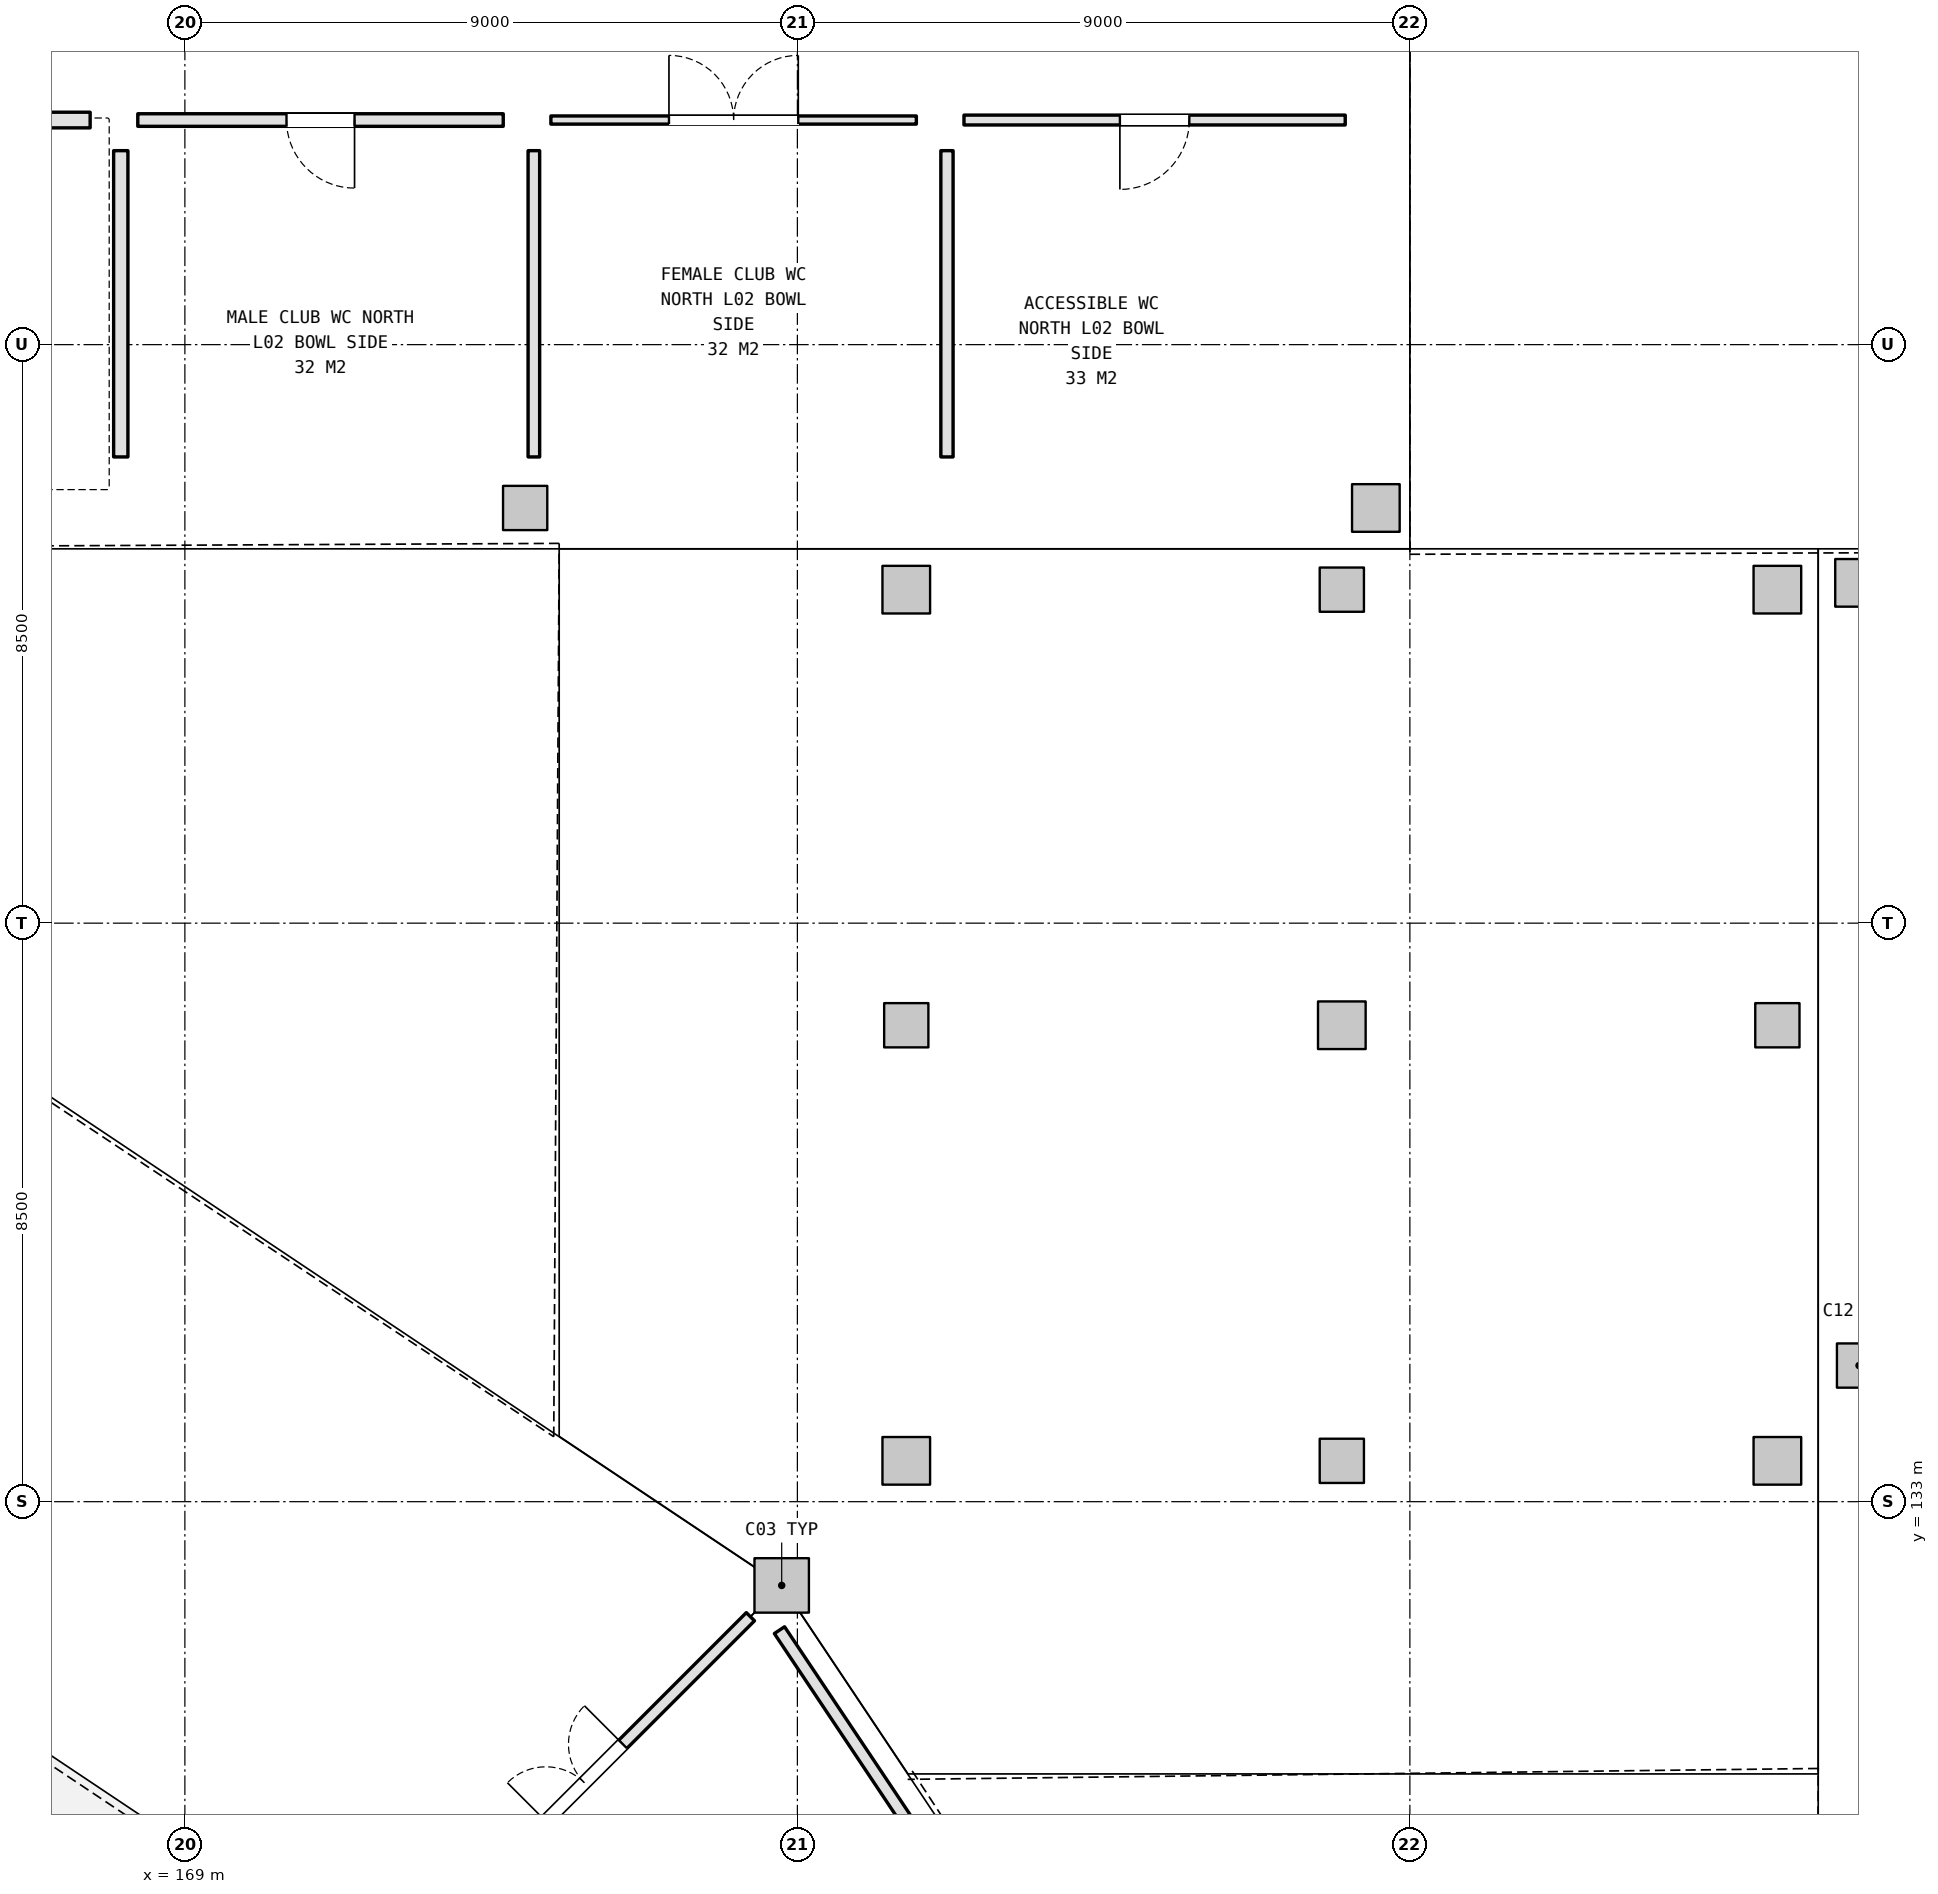
"""IFC4 building model, lengths in metres.
Left out: names, types, materials, properties, quantities, classifications, styles, units other than length and angle.
Written with IfcOpenShell. Run it as: python <this file> out.ifc"""

import sys

from ifc_helpers import new_model, si_unit, direction, frame, frame_2d, origin, origin_2d, place, context, subcontext, project, spatial, rectangle, extrude, element, fill, save


model = new_model("IFC4")
c1 = context("Model", 3, precision=1e-05, world=origin(), true_north=direction((0.0, 1.0)))
c2 = subcontext(c1, "Body", "Model", "MODEL_VIEW")
j1 = project(units=[si_unit("LENGTHUNIT", "METRE"), si_unit("PLANEANGLEUNIT", "RADIAN")], contexts=[c1])
p1 = place(None, origin())
s1 = spatial("IfcSite", under=j1, at=p1, CompositionType="ELEMENT")
p2 = place(p1, origin())
s2 = spatial("IfcBuilding", under=s1, at=p2, CompositionType="ELEMENT")
p3 = place(p2, frame((0.0, 0.0, 10.8)))
s3 = spatial("IfcBuildingStorey", under=s2, at=p3, CompositionType="ELEMENT", Elevation=10.8)
p4 = place(p3, frame((177.77, 131.77, 0.0), z_axis=(0.0, 0.0, 1.0), x_axis=(1.0, 0.0, 0.0)))
e1 = element("IfcColumn", 1, at=p4, inside=s3, PredefinedType="COLUMN", context=c2, shape_type="SweptSolid", body=[
    extrude(rectangle(XDim=0.8, YDim=0.8, at=origin_2d()), origin(), (0.0, 0.0, 1.0), 5.4),
])
p5 = place(p3, frame((193.6, 135.0, 0.0), z_axis=(0.0, 0.0, 1.0), x_axis=(1.0, 0.0, 0.0)))
e2 = element("IfcColumn", 2, at=p5, inside=s3, PredefinedType="COLUMN", context=c2, shape_type="SweptSolid", body=[
    extrude(rectangle(XDim=0.65, YDim=0.65, at=origin_2d()), origin(), (0.0, 0.0, 1.0), 5.4),
])
p6 = place(p3, frame((193.6, 146.5, 0.0), z_axis=(0.0, 0.0, 1.0), x_axis=(1.0, 0.0, 0.0)))
e3 = element("IfcColumn", 3, at=p6, inside=s3, PredefinedType="COLUMN", context=c2, shape_type="SweptSolid", body=[
    extrude(rectangle(XDim=0.7, YDim=0.7, at=origin_2d()), origin(), (0.0, 0.0, 1.0), 5.4),
])
p7 = place(p3, frame((174.0, 147.6, 0.0), z_axis=(0.0, 0.0, 1.0), x_axis=(1.0, 0.0, 0.0)))
e4 = element("IfcColumn", 4, at=p7, inside=s3, PredefinedType="COLUMN", context=c2, shape_type="SweptSolid", body=[
    extrude(rectangle(XDim=0.65, YDim=0.65, at=origin_2d()), origin(), (0.0, 0.0, 1.0), 5.4),
])
for number, where, z_axis, x_axis in (
    (5, (186.5, 147.6, 0.0), (0.0, 0.0, 1.0), (1.0, 0.0, 0.0)),
    (6, (179.6, 133.6, 0.0), (0.0, 0.0, 1.0), (1.0, 0.0, 0.0)),
):
    element("IfcColumn", number, at=place(p3, frame(where, z_axis=z_axis, x_axis=x_axis)), inside=s3, PredefinedType="COLUMN", context=c2, shape_type="SweptSolid", body=[
        extrude(rectangle(XDim=0.7, YDim=0.7, at=origin_2d()), origin(), (0.0, 0.0, 1.0), 5.4),
    ])
p8 = place(p3, frame((179.6, 140.0, 0.0), z_axis=(0.0, 0.0, 1.0), x_axis=(1.0, 0.0, 0.0)))
e7 = element("IfcColumn", 7, at=p8, inside=s3, PredefinedType="COLUMN", context=c2, shape_type="SweptSolid", body=[
    extrude(rectangle(XDim=0.65, YDim=0.65, at=origin_2d()), origin(), (0.0, 0.0, 1.0), 5.4),
])
p9 = place(p3, frame((179.6, 146.4, 0.0), z_axis=(0.0, 0.0, 1.0), x_axis=(1.0, 0.0, 0.0)))
e8 = element("IfcColumn", 8, at=p9, inside=s3, PredefinedType="COLUMN", context=c2, shape_type="SweptSolid", body=[
    extrude(rectangle(XDim=0.7, YDim=0.7, at=origin_2d()), origin(), (0.0, 0.0, 1.0), 5.4),
])
p10 = place(p3, frame((186.0, 133.6, 0.0), z_axis=(0.0, 0.0, 1.0), x_axis=(1.0, 0.0, 0.0)))
e9 = element("IfcColumn", 9, at=p10, inside=s3, PredefinedType="COLUMN", context=c2, shape_type="SweptSolid", body=[
    extrude(rectangle(XDim=0.65, YDim=0.65, at=origin_2d()), origin(), (0.0, 0.0, 1.0), 5.4),
])
p11 = place(p3, frame((186.0, 140.0, 0.0), z_axis=(0.0, 0.0, 1.0), x_axis=(1.0, 0.0, 0.0)))
e10 = element("IfcColumn", 10, at=p11, inside=s3, PredefinedType="COLUMN", context=c2, shape_type="SweptSolid", body=[
    extrude(rectangle(XDim=0.7, YDim=0.7, at=origin_2d()), origin(), (0.0, 0.0, 1.0), 5.4),
])
p12 = place(p3, frame((186.0, 146.4, 0.0), z_axis=(0.0, 0.0, 1.0), x_axis=(1.0, 0.0, 0.0)))
e11 = element("IfcColumn", 11, at=p12, inside=s3, PredefinedType="COLUMN", context=c2, shape_type="SweptSolid", body=[
    extrude(rectangle(XDim=0.65, YDim=0.65, at=origin_2d()), origin(), (0.0, 0.0, 1.0), 5.4),
])
p13 = place(p3, frame((192.4, 133.6, 0.0), z_axis=(0.0, 0.0, 1.0), x_axis=(1.0, 0.0, 0.0)))
e12 = element("IfcColumn", 12, at=p13, inside=s3, PredefinedType="COLUMN", context=c2, shape_type="SweptSolid", body=[
    extrude(rectangle(XDim=0.7, YDim=0.7, at=origin_2d()), origin(), (0.0, 0.0, 1.0), 5.4),
])
p14 = place(p3, frame((192.4, 140.0, 0.0), z_axis=(0.0, 0.0, 1.0), x_axis=(1.0, 0.0, 0.0)))
e13 = element("IfcColumn", 13, at=p14, inside=s3, PredefinedType="COLUMN", context=c2, shape_type="SweptSolid", body=[
    extrude(rectangle(XDim=0.65, YDim=0.65, at=origin_2d()), origin(), (0.0, 0.0, 1.0), 5.4),
])
p15 = place(p3, frame((192.4, 146.4, 0.0), z_axis=(0.0, 0.0, 1.0), x_axis=(1.0, 0.0, 0.0)))
e14 = element("IfcColumn", 14, at=p15, inside=s3, PredefinedType="COLUMN", context=c2, shape_type="SweptSolid", body=[
    extrude(rectangle(XDim=0.7, YDim=0.7, at=origin_2d()), origin(), (0.0, 0.0, 1.0), 5.4),
])
p16 = place(p3, frame((142.629, 153.3, 0.0), z_axis=(0.0, 0.0, 1.0), x_axis=(1.0, 0.0, 0.0)))
e15 = element("IfcWall", 15, at=p16, inside=s3, PredefinedType="PLUMBINGWALL", context=c2, shape_type="SweptSolid", body=[
    extrude(rectangle(XDim=24.979, YDim=0.23, at=frame_2d((12.49, 0.0))), origin(), (0.0, 0.0, 1.0), 4.505),
])
p17 = place(p16, frame((11.929, 0.0, 0.0)))
e16 = element("IfcOpeningElement", 16, at=p17, cuts=e15, PredefinedType="OPENING", context=c2, shape_type="SweptSolid", body=[
    extrude(rectangle(XDim=1.12, YDim=2.2, at=frame_2d((0.56, 1.1))), frame((0.0, 0.125, 0.0), z_axis=(0.0, -1.0, 0.0), x_axis=(1.0, 0.0, 0.0)), (0.0, 0.0, 1.0), 0.25),
])
p18 = place(p3, frame((168.308, 153.3, 0.0), z_axis=(0.0, 0.0, 1.0), x_axis=(1.0, 0.0, 0.0)))
e17 = element("IfcWall", 17, at=p18, inside=s3, PredefinedType="PARTITIONING", context=c2, shape_type="SweptSolid", body=[
    extrude(rectangle(XDim=5.37, YDim=0.185, at=frame_2d((2.685, 0.0))), origin(), (0.0, 0.0, 1.0), 4.505),
])
p19 = place(p18, frame((2.185, 0.0, 0.0)))
e18 = element("IfcOpeningElement", 18, at=p19, cuts=e17, PredefinedType="OPENING", context=c2, shape_type="SweptSolid", body=[
    extrude(rectangle(XDim=1.0, YDim=2.1, at=frame_2d((0.5, 1.05))), frame((0.0, 0.103, 0.0), z_axis=(0.0, -1.0, 0.0), x_axis=(1.0, 0.0, 0.0)), (0.0, 0.0, 1.0), 0.205),
])
p20 = place(p3, frame((168.058, 148.35, 0.0), z_axis=(0.0, 0.0, 1.0), x_axis=(0.0, 1.0, 0.0)))
e19 = element("IfcWall", 19, at=p20, inside=s3, PredefinedType="PLUMBINGWALL", context=c2, shape_type="SweptSolid", body=[
    extrude(rectangle(XDim=4.5, YDim=0.21, at=frame_2d((2.25, 0.0))), origin(), (0.0, 0.0, 1.0), 4.655),
])
p21 = place(p3, frame((174.378, 153.3, 0.0), z_axis=(0.0, 0.0, 1.0), x_axis=(1.0, 0.0, 0.0)))
e20 = element("IfcWall", 20, at=p21, inside=s3, PredefinedType="PARTITIONING", context=c2, shape_type="SweptSolid", body=[
    extrude(rectangle(XDim=5.37, YDim=0.12, at=frame_2d((2.685, 0.0))), origin(), (0.0, 0.0, 1.0), 5.12),
])
p22 = place(p21, frame((1.735, 0.0, 0.0)))
e21 = element("IfcOpeningElement", 21, at=p22, cuts=e20, PredefinedType="OPENING", context=c2, shape_type="SweptSolid", body=[
    extrude(rectangle(XDim=1.9, YDim=2.3, at=frame_2d((0.95, 1.15))), frame((0.0, 0.07, 0.0), z_axis=(0.0, -1.0, 0.0), x_axis=(1.0, 0.0, 0.0)), (0.0, 0.0, 1.0), 0.14),
])
p23 = place(p3, frame((174.128, 148.35, 0.0), z_axis=(0.0, 0.0, 1.0), x_axis=(0.0, 1.0, 0.0)))
e22 = element("IfcWall", 22, at=p23, inside=s3, PredefinedType="PARTITIONING", context=c2, shape_type="SweptSolid", body=[
    extrude(rectangle(XDim=4.5, YDim=0.17, at=frame_2d((2.25, 0.0))), origin(), (0.0, 0.0, 1.0), 4.505),
])
p24 = place(p3, frame((180.448, 153.3, 0.0), z_axis=(0.0, 0.0, 1.0), x_axis=(1.0, 0.0, 0.0)))
e23 = element("IfcWall", 23, at=p24, inside=s3, PredefinedType="PARTITIONING", context=c2, shape_type="SweptSolid", body=[
    extrude(rectangle(XDim=5.602, YDim=0.145, at=frame_2d((2.801, 0.0))), origin(), (0.0, 0.0, 1.0), 5.12),
])
p25 = place(p24, frame((2.291, 0.0, 0.0)))
e24 = element("IfcOpeningElement", 24, at=p25, cuts=e23, PredefinedType="OPENING", context=c2, shape_type="SweptSolid", body=[
    extrude(rectangle(XDim=1.02, YDim=2.15, at=frame_2d((0.51, 1.075))), frame((0.0, 0.083, 0.0), z_axis=(0.0, -1.0, 0.0), x_axis=(1.0, 0.0, 0.0)), (0.0, 0.0, 1.0), 0.165),
])
p26 = place(p3, frame((180.198, 148.35, 0.0), z_axis=(0.0, 0.0, 1.0), x_axis=(0.0, 1.0, 0.0)))
e25 = element("IfcWall", 25, at=p26, inside=s3, PredefinedType="PARTITIONING", context=c2, shape_type="SweptSolid", body=[
    extrude(rectangle(XDim=4.5, YDim=0.18, at=frame_2d((2.25, 0.0))), origin(), (0.0, 0.0, 1.0), 4.655),
])
p27 = place(p3, frame((172.431, 126.431, 0.0), z_axis=(0.0, 0.0, 1.0), x_axis=(0.707106781187, 0.707106781187, 0.0)))
e26 = element("IfcWall", 26, at=p27, inside=s3, PredefinedType="PARTITIONING", context=c2, shape_type="SweptSolid", body=[
    extrude(rectangle(XDim=6.9, YDim=0.17, at=frame_2d((3.45, 0.0))), origin(), (0.0, 0.0, 1.0), 4.255),
])
p28 = place(p27, frame((2.65, 0.0, 0.0)))
e27 = element("IfcOpeningElement", 27, at=p28, cuts=e26, PredefinedType="OPENING", context=c2, shape_type="SweptSolid", body=[
    extrude(rectangle(XDim=1.6, YDim=2.2, at=frame_2d((0.8, 1.1))), frame((0.0, 0.095, 0.0), z_axis=(0.0, -1.0, 0.0), x_axis=(1.0, 0.0, 0.0)), (0.0, 0.0, 1.0), 0.19),
])
p29 = place(p3, frame((177.737, 131.113, 0.0), z_axis=(0.0, 0.0, 1.0), x_axis=(0.555562946988, -0.831474480627, 0.0)))
e28 = element("IfcWall", 28, at=p29, inside=s3, PredefinedType="PARTITIONING", context=c2, shape_type="SweptSolid", body=[
    extrude(rectangle(XDim=19.192, YDim=0.18, at=frame_2d((9.596, 0.0))), origin(), (0.0, 0.0, 1.0), 5.12),
])
p30 = place(p19, frame((1.0, 0.0, 0.0), z_axis=(0.0, 0.0, 1.0), x_axis=(-1.0, 0.0, 0.0)))
e29 = element("IfcDoor", 29, at=p30, inside=s3, OperationType="SINGLE_SWING_RIGHT", PredefinedType="DOOR", context=c2, shape_type="SweptSolid", body=[
    extrude(rectangle(XDim=1.0, YDim=2.1, at=frame_2d((0.5, 1.05))), frame((0.0, 0.025, 0.0), z_axis=(0.0, -1.0, 0.0), x_axis=(1.0, 0.0, 0.0)), (0.0, 0.0, 1.0), 0.05),
])
fill(e18, e29)
p31 = place(p22, origin())
e30 = element("IfcDoor", 30, at=p31, inside=s3, OperationType="DOUBLE_DOOR_SINGLE_SWING", PredefinedType="DOOR", context=c2, shape_type="SweptSolid", body=[
    extrude(rectangle(XDim=1.9, YDim=2.3, at=frame_2d((0.95, 1.15))), frame((0.0, 0.025, 0.0), z_axis=(0.0, -1.0, 0.0), x_axis=(1.0, 0.0, 0.0)), (0.0, 0.0, 1.0), 0.05),
])
fill(e21, e30)
p32 = place(p25, frame((1.02, 0.0, 0.0), z_axis=(0.0, 0.0, 1.0), x_axis=(-1.0, 0.0, 0.0)))
e31 = element("IfcDoor", 31, at=p32, inside=s3, OperationType="SINGLE_SWING_LEFT", PredefinedType="DOOR", context=c2, shape_type="SweptSolid", body=[
    extrude(rectangle(XDim=1.02, YDim=2.15, at=frame_2d((0.51, 1.075))), frame((0.0, 0.025, 0.0), z_axis=(0.0, -1.0, 0.0), x_axis=(1.0, 0.0, 0.0)), (0.0, 0.0, 1.0), 0.05),
])
fill(e24, e31)
p33 = place(p28, origin())
e32 = element("IfcDoor", 32, at=p33, inside=s3, OperationType="DOUBLE_DOOR_SINGLE_SWING", PredefinedType="DOOR", context=c2, shape_type="SweptSolid", body=[
    extrude(rectangle(XDim=1.6, YDim=2.2, at=frame_2d((0.8, 1.1))), frame((0.0, 0.025, 0.0), z_axis=(0.0, -1.0, 0.0), x_axis=(1.0, 0.0, 0.0)), (0.0, 0.0, 1.0), 0.05),
])
fill(e27, e32)
save(model, sys.argv[1])
